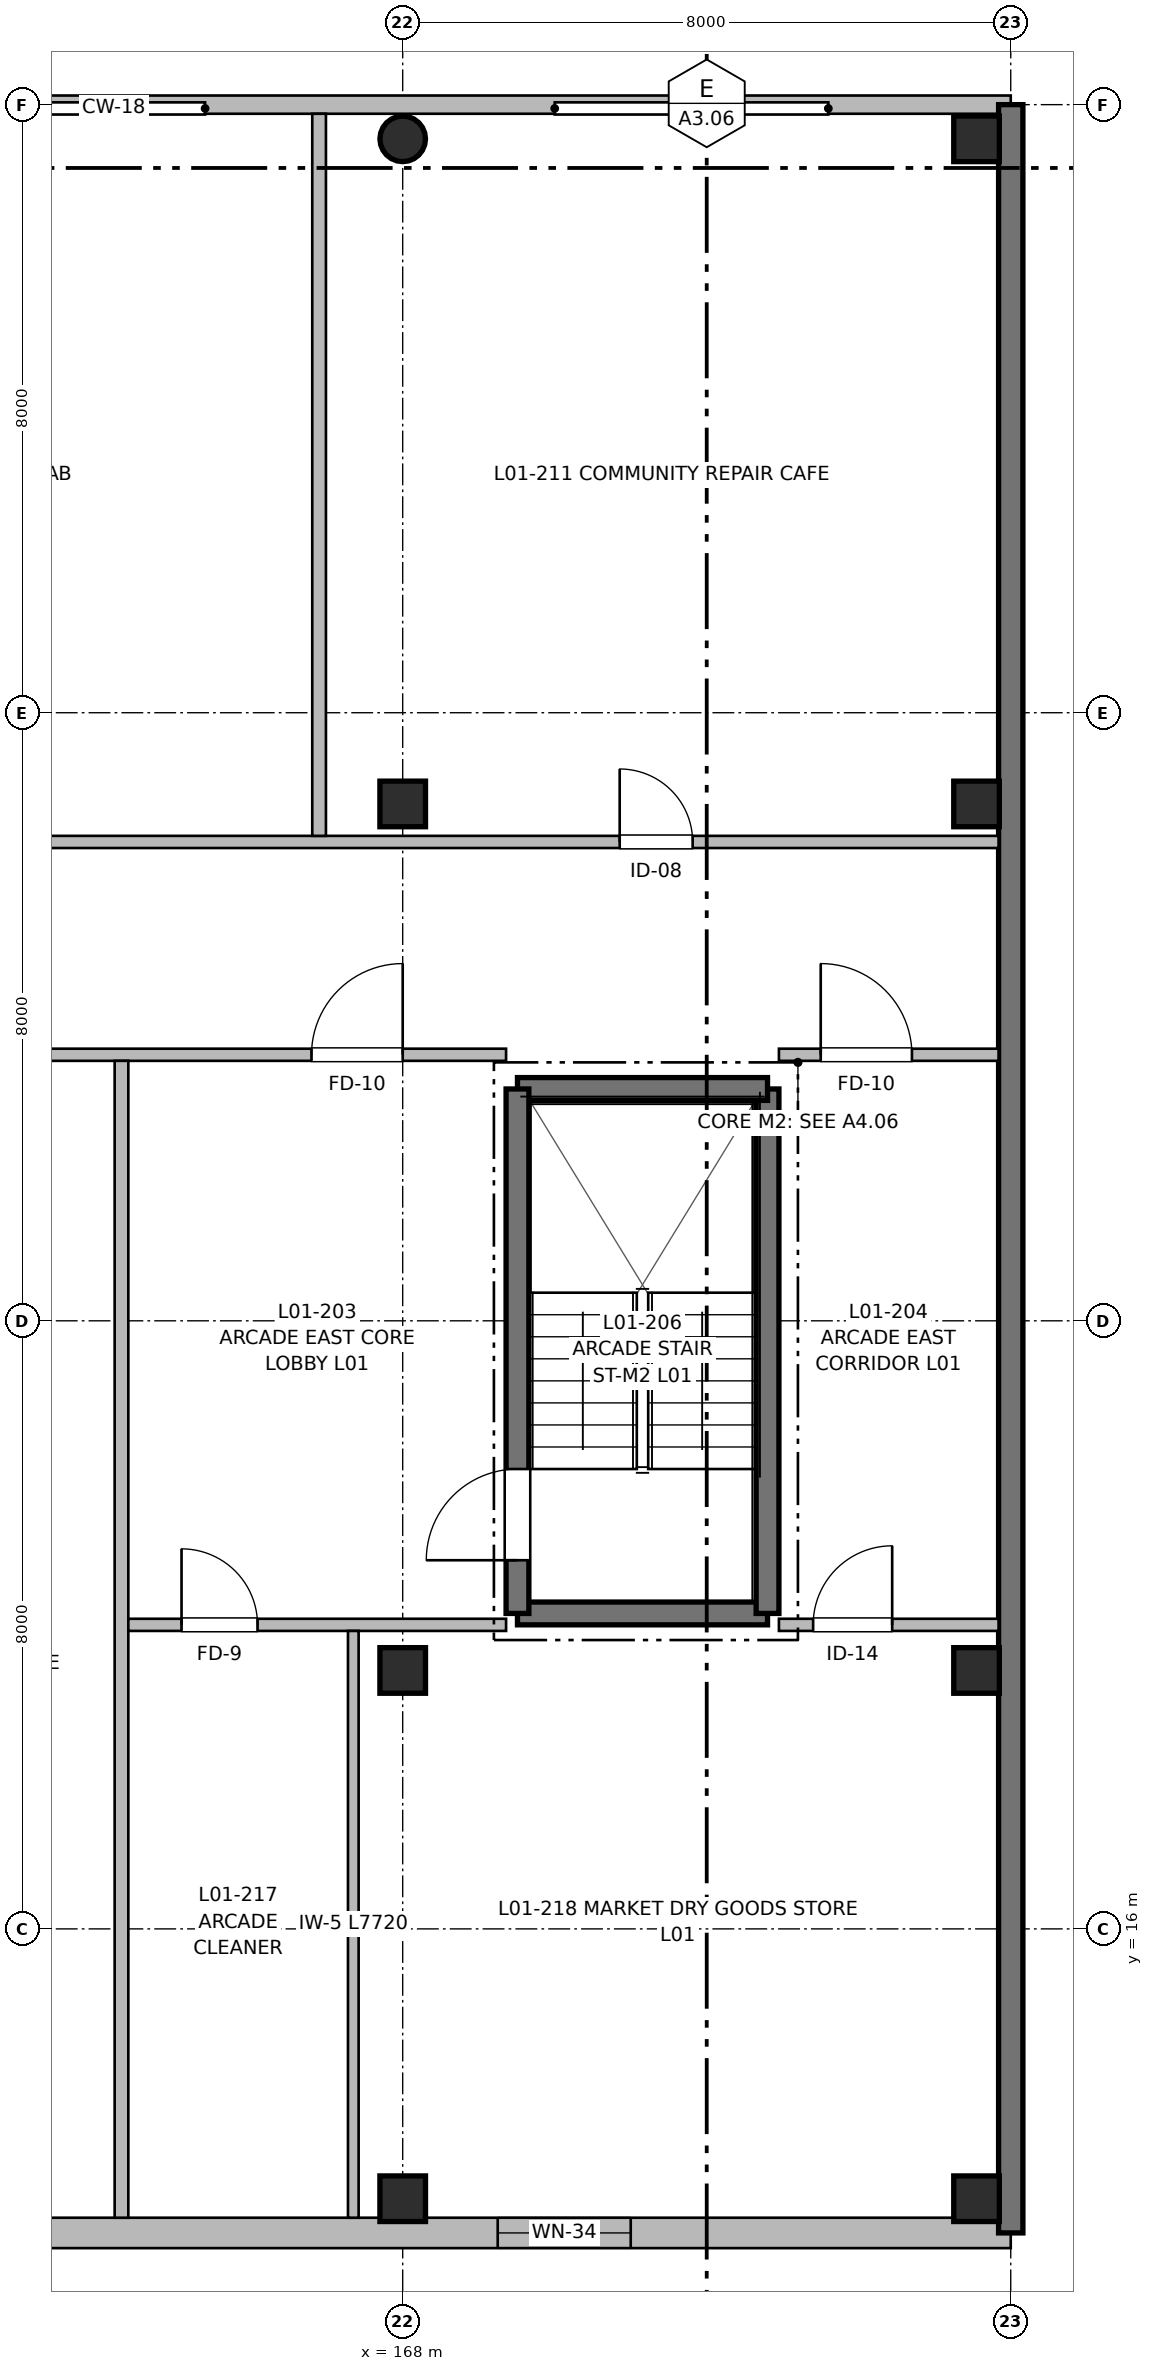
"""IFC4 building model, lengths in metres.
Left out: names, types, materials, properties, quantities, classifications, styles, units other than length and angle.
Written with IfcOpenShell. Run it as: python <this file> out.ifc"""

import sys

from ifc_helpers import new_model, si_unit, direction, frame, frame_2d, origin, origin_2d, place, context, subcontext, project, spatial, rectangle, circle, extrude, element, fill, save


model = new_model("IFC4")
c1 = context("Model", 3, precision=1e-05, world=origin(), true_north=direction((0.0, 1.0)))
c2 = subcontext(c1, "Body", "Model", "MODEL_VIEW")
j1 = project(units=[si_unit("LENGTHUNIT", "METRE"), si_unit("PLANEANGLEUNIT", "RADIAN")], contexts=[c1])
p1 = place(None, origin())
s1 = spatial("IfcSite", under=j1, at=p1, CompositionType="ELEMENT")
p2 = place(p1, origin())
s2 = spatial("IfcBuilding", under=s1, at=p2, CompositionType="ELEMENT")
p3 = place(p2, frame((0.0, 0.0, 4.16)))
s3 = spatial("IfcBuildingStorey", under=s2, at=p3, CompositionType="ELEMENT", Elevation=4.16)
for number, where, z_axis, x_axis in (
    (1, (168.0, 12.45, 0.0), (0.0, 0.0, 1.0), (1.0, 0.0, 0.0)),
    (2, (168.0, 19.4, 0.0), (0.0, 0.0, 1.0), (1.0, 0.0, 0.0)),
    (3, (168.0, 30.8, 0.0), (0.0, 0.0, 1.0), (1.0, 0.0, 0.0)),
):
    element("IfcColumn", number, at=place(p3, frame(where, z_axis=z_axis, x_axis=x_axis)), inside=s3, PredefinedType="COLUMN", context=c2, shape_type="SweptSolid", body=[
        extrude(rectangle(XDim=0.6, YDim=0.6, at=origin_2d()), origin(), (0.0, 0.0, 1.0), 3.2),
    ])
p4 = place(p3, frame((168.0, 39.55, 0.0), z_axis=(0.0, 0.0, 1.0), x_axis=(1.0, 0.0, 0.0)))
e4 = element("IfcColumn", 4, at=p4, inside=s3, PredefinedType="COLUMN", context=c2, shape_type="SweptSolid", body=[
    extrude(circle(Radius=0.3, at=origin_2d()), origin(), (0.0, 0.0, 1.0), 3.2),
])
for number, where, z_axis, x_axis in (
    (5, (175.55, 12.45, 0.0), (0.0, 0.0, 1.0), (1.0, 0.0, 0.0)),
    (6, (175.55, 19.4, 0.0), (0.0, 0.0, 1.0), (1.0, 0.0, 0.0)),
    (7, (175.55, 30.8, 0.0), (0.0, 0.0, 1.0), (1.0, 0.0, 0.0)),
    (8, (175.55, 39.55, 0.0), (0.0, 0.0, 1.0), (1.0, 0.0, 0.0)),
):
    element("IfcColumn", number, at=place(p3, frame(where, z_axis=z_axis, x_axis=x_axis)), inside=s3, PredefinedType="COLUMN", context=c2, shape_type="SweptSolid", body=[
        extrude(rectangle(XDim=0.6, YDim=0.6, at=origin_2d()), origin(), (0.0, 0.0, 1.0), 3.2),
    ])
p5 = place(p3, frame((176.0, 12.0, 0.0), z_axis=(0.0, 0.0, 1.0), x_axis=(-1.0, 0.0, 0.0)))
e9 = element("IfcWall", 9, at=p5, inside=s3, PredefinedType="SOLIDWALL", context=c2, shape_type="SweptSolid", body=[
    extrude(rectangle(XDim=48.0, YDim=0.4, at=frame_2d((24.0, 0.0))), origin(), (0.0, 0.0, 1.0), 2.94),
])
p6 = place(p5, frame((5.0, 0.0, 0.62)))
e10 = element("IfcOpeningElement", 10, at=p6, cuts=e9, PredefinedType="OPENING", context=c2, shape_type="SweptSolid", body=[
    extrude(rectangle(XDim=1.75, YDim=1.6, at=frame_2d((0.875, 0.8))), frame((0.0, 0.21, 0.0), z_axis=(0.0, -1.0, 0.0), x_axis=(1.0, 0.0, 0.0)), (0.0, 0.0, 1.0), 0.42),
])
p7 = place(p5, frame((15.45, 0.0, 1.52)))
e11 = element("IfcOpeningElement", 11, at=p7, cuts=e9, PredefinedType="OPENING", context=c2, shape_type="SweptSolid", body=[
    extrude(rectangle(XDim=0.8, YDim=0.7, at=frame_2d((0.4, 0.35))), frame((0.0, 0.21, 0.0), z_axis=(0.0, -1.0, 0.0), x_axis=(1.0, 0.0, 0.0)), (0.0, 0.0, 1.0), 0.42),
])
p8 = place(p5, frame((27.0, 0.0, 1.52)))
e12 = element("IfcOpeningElement", 12, at=p8, cuts=e9, PredefinedType="OPENING", context=c2, shape_type="SweptSolid", body=[
    extrude(rectangle(XDim=0.8, YDim=0.7, at=frame_2d((0.4, 0.35))), frame((0.0, 0.21, 0.0), z_axis=(0.0, -1.0, 0.0), x_axis=(1.0, 0.0, 0.0)), (0.0, 0.0, 1.0), 0.42),
])
p9 = place(p5, frame((38.0, 0.0, 0.45)))
e13 = element("IfcOpeningElement", 13, at=p9, cuts=e9, PredefinedType="OPENING", context=c2, shape_type="SweptSolid", body=[
    extrude(rectangle(XDim=1.55, YDim=1.85, at=frame_2d((0.775, 0.925))), frame((0.0, 0.21, 0.0), z_axis=(0.0, -1.0, 0.0), x_axis=(1.0, 0.0, 0.0)), (0.0, 0.0, 1.0), 0.42),
])
p10 = place(p3, frame((128.0, 40.0, 0.0), z_axis=(0.0, 0.0, 1.0), x_axis=(1.0, 0.0, 0.0)))
e14 = element("IfcWall", 14, at=p10, inside=s3, PredefinedType="SOLIDWALL", context=c2, shape_type="SweptSolid", body=[
    extrude(rectangle(XDim=48.0, YDim=0.24, at=frame_2d((24.0, 0.0))), origin(), (0.0, 0.0, 1.0), 2.94),
])
p11 = place(p3, frame((176.0, 40.0, 0.0), z_axis=(0.0, 0.0, 1.0), x_axis=(0.0, -1.0, 0.0)))
e15 = element("IfcWall", 15, at=p11, inside=s3, PredefinedType="SHEAR", context=c2, shape_type="SweptSolid", body=[
    extrude(rectangle(XDim=28.0, YDim=0.32, at=frame_2d((14.0, 0.0))), origin(), (0.0, 0.0, 1.0), 2.94),
])
p12 = place(p3, frame((172.8, 20.15, 0.0), z_axis=(0.0, 0.0, 1.0), x_axis=(-1.0, 0.0, 0.0)))
e16 = element("IfcWall", 16, at=p12, inside=s3, PredefinedType="SHEAR", context=c2, shape_type="SweptSolid", body=[
    extrude(rectangle(XDim=3.29, YDim=0.3, at=frame_2d((1.645, 0.0))), origin(), (0.0, 0.0, 1.0), 3.2),
])
p13 = place(p3, frame((172.8, 27.05, 0.0), z_axis=(0.0, 0.0, 1.0), x_axis=(0.0, -1.0, 0.0)))
e17 = element("IfcWall", 17, at=p13, inside=s3, PredefinedType="SHEAR", context=c2, shape_type="SweptSolid", body=[
    extrude(rectangle(XDim=6.9, YDim=0.3, at=frame_2d((3.45, 0.0))), origin(), (0.0, 0.0, 1.0), 3.2),
])
p14 = place(p3, frame((169.51, 27.05, 0.0), z_axis=(0.0, 0.0, 1.0), x_axis=(1.0, 0.0, 0.0)))
e18 = element("IfcWall", 18, at=p14, inside=s3, PredefinedType="SHEAR", context=c2, shape_type="SweptSolid", body=[
    extrude(rectangle(XDim=3.29, YDim=0.3, at=frame_2d((1.645, 0.0))), origin(), (0.0, 0.0, 1.0), 3.2),
])
p15 = place(p3, frame((169.51, 20.15, 0.0), z_axis=(0.0, 0.0, 1.0), x_axis=(0.0, 1.0, 0.0)))
e19 = element("IfcWall", 19, at=p15, inside=s3, PredefinedType="SHEAR", context=c2, shape_type="SweptSolid", body=[
    extrude(rectangle(XDim=6.9, YDim=0.3, at=frame_2d((3.45, 0.0))), origin(), (0.0, 0.0, 1.0), 3.2),
])
p16 = place(p15, frame((0.7, 0.0, 0.0)))
e20 = element("IfcOpeningElement", 20, at=p16, cuts=e19, PredefinedType="OPENING", context=c2, shape_type="SweptSolid", body=[
    extrude(rectangle(XDim=1.2, YDim=2.2, at=frame_2d((0.6, 1.1))), frame((0.0, 0.16, 0.0), z_axis=(0.0, -1.0, 0.0), x_axis=(1.0, 0.0, 0.0)), (0.0, 0.0, 1.0), 0.32),
])
p17 = place(p3, frame((133.35, 27.5, 0.0), z_axis=(0.0, 0.0, 1.0), x_axis=(1.0, 0.0, 0.0)))
e21 = element("IfcWall", 21, at=p17, inside=s3, PredefinedType="PARTITIONING", context=c2, shape_type="SweptSolid", body=[
    extrude(rectangle(XDim=36.01, YDim=0.16, at=frame_2d((18.005, 0.0))), origin(), (0.0, 0.0, 1.0), 2.93),
])
p18 = place(p17, frame((2.15, 0.0, 0.0)))
e22 = element("IfcOpeningElement", 22, at=p18, cuts=e21, PredefinedType="OPENING", context=c2, shape_type="SweptSolid", body=[
    extrude(rectangle(XDim=1.2, YDim=2.2, at=frame_2d((0.6, 1.1))), frame((0.0, 0.09, 0.0), z_axis=(0.0, -1.0, 0.0), x_axis=(1.0, 0.0, 0.0)), (0.0, 0.0, 1.0), 0.18),
])
p19 = place(p17, frame((33.45, 0.0, 0.0)))
e23 = element("IfcOpeningElement", 23, at=p19, cuts=e21, PredefinedType="OPENING", context=c2, shape_type="SweptSolid", body=[
    extrude(rectangle(XDim=1.2, YDim=2.2, at=frame_2d((0.6, 1.1))), frame((0.0, 0.09, 0.0), z_axis=(0.0, -1.0, 0.0), x_axis=(1.0, 0.0, 0.0)), (0.0, 0.0, 1.0), 0.18),
])
p20 = place(p17, frame((8.93, 0.0, 0.0)))
e24 = element("IfcOpeningElement", 24, at=p20, cuts=e21, PredefinedType="OPENING", context=c2, shape_type="SweptSolid", body=[
    extrude(rectangle(XDim=1.0, YDim=2.1, at=frame_2d((0.5, 1.05))), frame((0.0, 0.09, 0.0), z_axis=(0.0, -1.0, 0.0), x_axis=(1.0, 0.0, 0.0)), (0.0, 0.0, 1.0), 0.18),
])
p21 = place(p17, frame((18.13, 0.0, 0.0)))
e25 = element("IfcOpeningElement", 25, at=p21, cuts=e21, PredefinedType="OPENING", context=c2, shape_type="SweptSolid", body=[
    extrude(rectangle(XDim=1.5, YDim=2.2, at=frame_2d((0.75, 1.1))), frame((0.0, 0.09, 0.0), z_axis=(0.0, -1.0, 0.0), x_axis=(1.0, 0.0, 0.0)), (0.0, 0.0, 1.0), 0.18),
])
p22 = place(p17, frame((25.53, 0.0, 0.0)))
e26 = element("IfcOpeningElement", 26, at=p22, cuts=e21, PredefinedType="OPENING", context=c2, shape_type="SweptSolid", body=[
    extrude(rectangle(XDim=0.86, YDim=2.1, at=frame_2d((0.43, 1.05))), frame((0.0, 0.09, 0.0), z_axis=(0.0, -1.0, 0.0), x_axis=(1.0, 0.0, 0.0)), (0.0, 0.0, 1.0), 0.18),
])
p23 = place(p17, frame((28.83, 0.0, 0.0)))
e27 = element("IfcOpeningElement", 27, at=p23, cuts=e21, PredefinedType="OPENING", context=c2, shape_type="SweptSolid", body=[
    extrude(rectangle(XDim=0.94, YDim=2.1, at=frame_2d((0.47, 1.05))), frame((0.0, 0.09, 0.0), z_axis=(0.0, -1.0, 0.0), x_axis=(1.0, 0.0, 0.0)), (0.0, 0.0, 1.0), 0.18),
])
p24 = place(p3, frame((172.95, 27.5, 0.0), z_axis=(0.0, 0.0, 1.0), x_axis=(1.0, 0.0, 0.0)))
e28 = element("IfcWall", 28, at=p24, inside=s3, PredefinedType="PARTITIONING", context=c2, shape_type="SweptSolid", body=[
    extrude(rectangle(XDim=2.89, YDim=0.16, at=frame_2d((1.445, 0.0))), origin(), (0.0, 0.0, 1.0), 2.93),
])
p25 = place(p24, frame((0.55, 0.0, 0.0)))
e29 = element("IfcOpeningElement", 29, at=p25, cuts=e28, PredefinedType="OPENING", context=c2, shape_type="SweptSolid", body=[
    extrude(rectangle(XDim=1.2, YDim=2.2, at=frame_2d((0.6, 1.1))), frame((0.0, 0.09, 0.0), z_axis=(0.0, -1.0, 0.0), x_axis=(1.0, 0.0, 0.0)), (0.0, 0.0, 1.0), 0.18),
])
p26 = place(p3, frame((128.16, 30.3, 0.0), z_axis=(0.0, 0.0, 1.0), x_axis=(1.0, 0.0, 0.0)))
e30 = element("IfcWall", 30, at=p26, inside=s3, PredefinedType="PARTITIONING", context=c2, shape_type="SweptSolid", body=[
    extrude(rectangle(XDim=47.68, YDim=0.16, at=frame_2d((23.84, 0.0))), origin(), (0.0, 0.0, 1.0), 2.93),
])
p27 = place(p26, frame((5.785, 0.0, 0.0)))
e31 = element("IfcOpeningElement", 31, at=p27, cuts=e30, PredefinedType="OPENING", context=c2, shape_type="SweptSolid", body=[
    extrude(rectangle(XDim=1.04, YDim=2.15, at=frame_2d((0.52, 1.075))), frame((0.0, 0.09, 0.0), z_axis=(0.0, -1.0, 0.0), x_axis=(1.0, 0.0, 0.0)), (0.0, 0.0, 1.0), 0.18),
])
p28 = place(p26, frame((17.99, 0.0, 0.0)))
e32 = element("IfcOpeningElement", 32, at=p28, cuts=e30, PredefinedType="OPENING", context=c2, shape_type="SweptSolid", body=[
    extrude(rectangle(XDim=1.04, YDim=2.15, at=frame_2d((0.52, 1.075))), frame((0.0, 0.09, 0.0), z_axis=(0.0, -1.0, 0.0), x_axis=(1.0, 0.0, 0.0)), (0.0, 0.0, 1.0), 0.18),
])
p29 = place(p26, frame((32.19, 0.0, 0.0)))
e33 = element("IfcOpeningElement", 33, at=p29, cuts=e30, PredefinedType="OPENING", context=c2, shape_type="SweptSolid", body=[
    extrude(rectangle(XDim=1.04, YDim=2.15, at=frame_2d((0.52, 1.075))), frame((0.0, 0.09, 0.0), z_axis=(0.0, -1.0, 0.0), x_axis=(1.0, 0.0, 0.0)), (0.0, 0.0, 1.0), 0.18),
])
p30 = place(p26, frame((42.695, 0.0, 0.0)))
e34 = element("IfcOpeningElement", 34, at=p30, cuts=e30, PredefinedType="OPENING", context=c2, shape_type="SweptSolid", body=[
    extrude(rectangle(XDim=0.96, YDim=2.15, at=frame_2d((0.48, 1.075))), frame((0.0, 0.09, 0.0), z_axis=(0.0, -1.0, 0.0), x_axis=(1.0, 0.0, 0.0)), (0.0, 0.0, 1.0), 0.18),
])
p31 = place(p3, frame((164.3, 12.2, 0.0), z_axis=(0.0, 0.0, 1.0), x_axis=(0.0, 1.0, 0.0)))
e35 = element("IfcWall", 35, at=p31, inside=s3, PredefinedType="PARTITIONING", context=c2, shape_type="SweptSolid", body=[
    extrude(rectangle(XDim=15.22, YDim=0.18, at=frame_2d((7.61, 0.0))), origin(), (0.0, 0.0, 1.0), 2.93),
])
p32 = place(p3, frame((166.9, 30.38, 0.0), z_axis=(0.0, 0.0, 1.0), x_axis=(0.0, 1.0, 0.0)))
e36 = element("IfcWall", 36, at=p32, inside=s3, PredefinedType="PARTITIONING", context=c2, shape_type="SweptSolid", body=[
    extrude(rectangle(XDim=9.5, YDim=0.18, at=frame_2d((4.75, 0.0))), origin(), (0.0, 0.0, 1.0), 2.93),
])
p33 = place(p3, frame((164.39, 20.0, 0.0), z_axis=(0.0, 0.0, 1.0), x_axis=(1.0, 0.0, 0.0)))
e37 = element("IfcWall", 37, at=p33, inside=s3, PredefinedType="PARTITIONING", context=c2, shape_type="SweptSolid", body=[
    extrude(rectangle(XDim=4.97, YDim=0.16, at=frame_2d((2.485, 0.0))), origin(), (0.0, 0.0, 1.0), 2.93),
])
p34 = place(p33, frame((0.7, 0.0, 0.0)))
e38 = element("IfcOpeningElement", 38, at=p34, cuts=e37, PredefinedType="OPENING", context=c2, shape_type="SweptSolid", body=[
    extrude(rectangle(XDim=1.0, YDim=2.1, at=frame_2d((0.5, 1.05))), frame((0.0, 0.09, 0.0), z_axis=(0.0, -1.0, 0.0), x_axis=(1.0, 0.0, 0.0)), (0.0, 0.0, 1.0), 0.18),
])
p35 = place(p3, frame((172.95, 20.0, 0.0), z_axis=(0.0, 0.0, 1.0), x_axis=(1.0, 0.0, 0.0)))
e39 = element("IfcWall", 39, at=p35, inside=s3, PredefinedType="PARTITIONING", context=c2, shape_type="SweptSolid", body=[
    extrude(rectangle(XDim=2.89, YDim=0.16, at=frame_2d((1.445, 0.0))), origin(), (0.0, 0.0, 1.0), 2.93),
])
p36 = place(p35, frame((0.45, 0.0, 0.0)))
e40 = element("IfcOpeningElement", 40, at=p36, cuts=e39, PredefinedType="OPENING", context=c2, shape_type="SweptSolid", body=[
    extrude(rectangle(XDim=1.04, YDim=2.15, at=frame_2d((0.52, 1.075))), frame((0.0, 0.09, 0.0), z_axis=(0.0, -1.0, 0.0), x_axis=(1.0, 0.0, 0.0)), (0.0, 0.0, 1.0), 0.18),
])
p37 = place(p3, frame((167.35, 12.2, 0.0), z_axis=(0.0, 0.0, 1.0), x_axis=(0.0, 1.0, 0.0)))
e41 = element("IfcWall", 41, at=p37, inside=s3, PredefinedType="PARTITIONING", context=c2, shape_type="SweptSolid", body=[
    extrude(rectangle(XDim=7.72, YDim=0.14, at=frame_2d((3.86, 0.0))), origin(), (0.0, 0.0, 1.0), 2.93),
])
p38 = place(p6, origin())
e42 = element("IfcWindow", 42, at=p38, inside=s3, PartitioningType="SINGLE_PANEL", PredefinedType="WINDOW", context=c2, shape_type="SweptSolid", body=[
    extrude(rectangle(XDim=1.75, YDim=1.6, at=frame_2d((0.875, 0.8))), frame((0.0, 0.03, 0.0), z_axis=(0.0, -1.0, 0.0), x_axis=(1.0, 0.0, 0.0)), (0.0, 0.0, 1.0), 0.06),
])
fill(e10, e42)
p39 = place(p16, origin())
e43 = element("IfcDoor", 43, at=p39, inside=s3, OperationType="SINGLE_SWING_LEFT", PredefinedType="DOOR", context=c2, shape_type="SweptSolid", body=[
    extrude(rectangle(XDim=1.2, YDim=2.2, at=frame_2d((0.6, 1.1))), frame((0.0, 0.025, 0.0), z_axis=(0.0, -1.0, 0.0), x_axis=(1.0, 0.0, 0.0)), (0.0, 0.0, 1.0), 0.05),
])
fill(e20, e43)
p40 = place(p19, origin())
e44 = element("IfcDoor", 44, at=p40, inside=s3, OperationType="SINGLE_SWING_RIGHT", PredefinedType="DOOR", context=c2, shape_type="SweptSolid", body=[
    extrude(rectangle(XDim=1.2, YDim=2.2, at=frame_2d((0.6, 1.1))), frame((0.0, 0.025, 0.0), z_axis=(0.0, -1.0, 0.0), x_axis=(1.0, 0.0, 0.0)), (0.0, 0.0, 1.0), 0.05),
])
fill(e23, e44)
p41 = place(p25, origin())
e45 = element("IfcDoor", 45, at=p41, inside=s3, OperationType="SINGLE_SWING_LEFT", PredefinedType="DOOR", context=c2, shape_type="SweptSolid", body=[
    extrude(rectangle(XDim=1.2, YDim=2.2, at=frame_2d((0.6, 1.1))), frame((0.0, 0.025, 0.0), z_axis=(0.0, -1.0, 0.0), x_axis=(1.0, 0.0, 0.0)), (0.0, 0.0, 1.0), 0.05),
])
fill(e29, e45)
p42 = place(p30, origin())
e46 = element("IfcDoor", 46, at=p42, inside=s3, OperationType="SINGLE_SWING_LEFT", PredefinedType="DOOR", context=c2, shape_type="SweptSolid", body=[
    extrude(rectangle(XDim=0.96, YDim=2.15, at=frame_2d((0.48, 1.075))), frame((0.0, 0.025, 0.0), z_axis=(0.0, -1.0, 0.0), x_axis=(1.0, 0.0, 0.0)), (0.0, 0.0, 1.0), 0.05),
])
fill(e34, e46)
p43 = place(p34, origin())
e47 = element("IfcDoor", 47, at=p43, inside=s3, OperationType="SINGLE_SWING_LEFT", PredefinedType="DOOR", context=c2, shape_type="SweptSolid", body=[
    extrude(rectangle(XDim=1.0, YDim=2.1, at=frame_2d((0.5, 1.05))), frame((0.0, 0.025, 0.0), z_axis=(0.0, -1.0, 0.0), x_axis=(1.0, 0.0, 0.0)), (0.0, 0.0, 1.0), 0.05),
])
fill(e38, e47)
p44 = place(p36, origin())
e48 = element("IfcDoor", 48, at=p44, inside=s3, OperationType="SINGLE_SWING_RIGHT", PredefinedType="DOOR", context=c2, shape_type="SweptSolid", body=[
    extrude(rectangle(XDim=1.04, YDim=2.15, at=frame_2d((0.52, 1.075))), frame((0.0, 0.025, 0.0), z_axis=(0.0, -1.0, 0.0), x_axis=(1.0, 0.0, 0.0)), (0.0, 0.0, 1.0), 0.05),
])
fill(e40, e48)
save(model, sys.argv[1])
